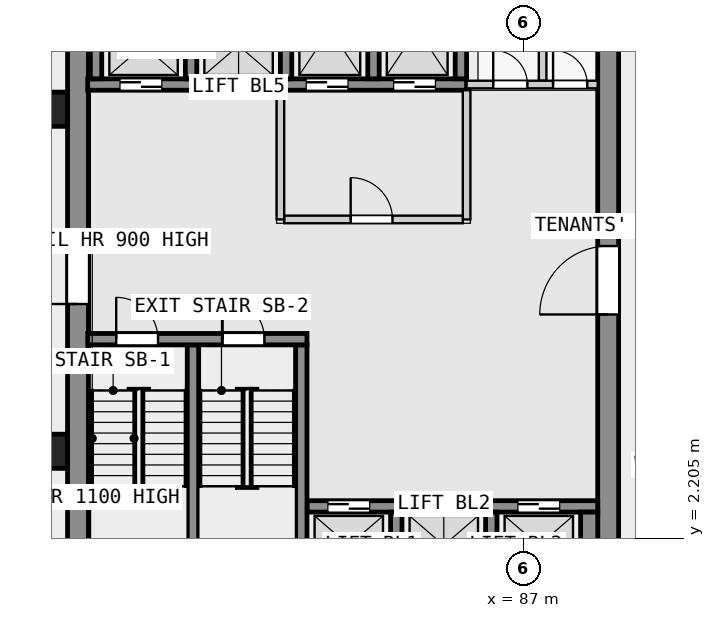
"""IFC4 building model, lengths in metres.
Left out: names, types, materials, properties, quantities, classifications, styles, units other than length and angle.
Written with IfcOpenShell. Run it as: python <this file> out.ifc"""

import sys

from ifc_helpers import new_model, si_unit, direction, frame, frame_2d, origin, origin_2d, place, context, subcontext, project, spatial, rectangle, extrude, element, fill, save


model = new_model("IFC4")
c1 = context("Model", 3, precision=1e-05, world=origin(), true_north=direction((0.0, 1.0)))
c2 = subcontext(c1, "Body", "Model", "MODEL_VIEW")
j1 = project(units=[si_unit("LENGTHUNIT", "METRE"), si_unit("PLANEANGLEUNIT", "RADIAN")], contexts=[c1])
p1 = place(None, origin())
s1 = spatial("IfcSite", under=j1, at=p1, CompositionType="ELEMENT")
p2 = place(p1, origin())
s2 = spatial("IfcBuilding", under=s1, at=p2, CompositionType="ELEMENT")
p3 = place(p2, frame((0.0, 0.0, 26.8)))
s3 = spatial("IfcBuildingStorey", under=s2, at=p3, CompositionType="ELEMENT", Elevation=26.8)
for number, where, z_axis, x_axis in (
    (1, (74.55, 13.5, 0.0), (0.0, 0.0, 1.0), (1.0, 0.0, 0.0)),
    (2, (74.55, 4.5, 0.0), (0.0, 0.0, 1.0), (1.0, 0.0, 0.0)),
):
    element("IfcColumn", number, at=place(p3, frame(where, z_axis=z_axis, x_axis=x_axis)), inside=s3, PredefinedType="COLUMN", context=c2, shape_type="SweptSolid", body=[
        extrude(rectangle(XDim=0.9, YDim=0.9, at=origin_2d()), origin(), (0.0, 0.0, 1.0), 3.5),
    ])
p4 = place(p3, frame((75.275, 0.55, 0.0), z_axis=(0.0, 0.0, 1.0), x_axis=(0.0, 1.0, 0.0)))
e3 = element("IfcWall", 3, at=p4, inside=s3, PredefinedType="SHEAR", context=c2, shape_type="SweptSolid", body=[
    extrude(rectangle(XDim=16.9, YDim=0.55, at=frame_2d((8.45, 0.0))), origin(), (0.0, 0.0, 1.0), 3.25),
])
p5 = place(p4, frame((7.825, 0.0, 0.0)))
e4 = element("IfcOpeningElement", 4, at=p5, cuts=e3, PredefinedType="OPENING", context=c2, shape_type="SweptSolid", body=[
    extrude(rectangle(XDim=1.8, YDim=2.1, at=frame_2d((0.9, 1.05))), frame((0.0, 0.285, 0.0), z_axis=(0.0, -1.0, 0.0), x_axis=(1.0, 0.0, 0.0)), (0.0, 0.0, 1.0), 0.57),
])
p6 = place(p3, frame((89.225, 0.55, 0.0), z_axis=(0.0, 0.0, 1.0), x_axis=(0.0, 1.0, 0.0)))
e5 = element("IfcWall", 5, at=p6, inside=s3, PredefinedType="SHEAR", context=c2, shape_type="SweptSolid", body=[
    extrude(rectangle(XDim=16.9, YDim=0.55, at=frame_2d((8.45, 0.0))), origin(), (0.0, 0.0, 1.0), 3.25),
])
p7 = place(p6, frame((7.55, 0.0, 0.0)))
e6 = element("IfcOpeningElement", 6, at=p7, cuts=e5, PredefinedType="OPENING", context=c2, shape_type="SweptSolid", body=[
    extrude(rectangle(XDim=1.8, YDim=2.1, at=frame_2d((0.9, 1.05))), frame((0.0, 0.285, 0.0), z_axis=(0.0, -1.0, 0.0), x_axis=(1.0, 0.0, 0.0)), (0.0, 0.0, 1.0), 0.57),
])
p8 = place(p3, frame((75.53, 7.45, 0.0), z_axis=(0.0, 0.0, 1.0), x_axis=(1.0, 0.0, 0.0)))
e7 = element("IfcWall", 7, at=p8, inside=s3, PredefinedType="SHEAR", context=c2, shape_type="SweptSolid", body=[
    extrude(rectangle(XDim=5.77, YDim=0.3, at=frame_2d((2.885, 0.0))), origin(), (0.0, 0.0, 1.0), 3.25),
])
p9 = place(p8, frame((0.75, 0.0, 0.0)))
e8 = element("IfcOpeningElement", 8, at=p9, cuts=e7, PredefinedType="OPENING", context=c2, shape_type="SweptSolid", body=[
    extrude(rectangle(XDim=1.1, YDim=2.1, at=frame_2d((0.55, 1.05))), frame((0.0, 0.16, 0.0), z_axis=(0.0, -1.0, 0.0), x_axis=(1.0, 0.0, 0.0)), (0.0, 0.0, 1.0), 0.32),
])
p10 = place(p8, frame((3.55, 0.0, 0.0)))
e9 = element("IfcOpeningElement", 9, at=p10, cuts=e7, PredefinedType="OPENING", context=c2, shape_type="SweptSolid", body=[
    extrude(rectangle(XDim=1.1, YDim=2.1, at=frame_2d((0.55, 1.05))), frame((0.0, 0.16, 0.0), z_axis=(0.0, -1.0, 0.0), x_axis=(1.0, 0.0, 0.0)), (0.0, 0.0, 1.0), 0.32),
])
for number, where, z_axis, x_axis in (
    (10, (78.3, 0.9, 0.0), (0.0, 0.0, 1.0), (0.0, 1.0, 0.0)),
    (11, (81.15, 0.9, 0.0), (0.0, 0.0, 1.0), (0.0, 1.0, 0.0)),
):
    element("IfcWall", number, at=place(p3, frame(where, z_axis=z_axis, x_axis=x_axis)), inside=s3, PredefinedType="SHEAR", context=c2, shape_type="SweptSolid", body=[
        extrude(rectangle(XDim=6.4, YDim=0.3, at=frame_2d((3.2, 0.0))), origin(), (0.0, 0.0, 1.0), 3.25),
    ])
for number, where, z_axis, x_axis in (
    (12, (83.65, 0.9, 0.0), (0.0, 0.0, 1.0), (0.0, 1.0, 0.0)),
    (13, (86.15, 0.9, 0.0), (0.0, 0.0, 1.0), (0.0, 1.0, 0.0)),
):
    element("IfcWall", number, at=place(p3, frame(where, z_axis=z_axis, x_axis=x_axis)), inside=s3, PredefinedType="SHEAR", context=c2, shape_type="SweptSolid", body=[
        extrude(rectangle(XDim=2.0, YDim=0.3, at=frame_2d((1.0, 0.0))), origin(), (0.0, 0.0, 1.0), 3.25),
    ])
p11 = place(p3, frame((88.725, 0.9, 0.0), z_axis=(0.0, 0.0, 1.0), x_axis=(0.0, 1.0, 0.0)))
e14 = element("IfcWall", 14, at=p11, inside=s3, PredefinedType="SHEAR", context=c2, shape_type="SweptSolid", body=[
    extrude(rectangle(XDim=2.0, YDim=0.45, at=frame_2d((1.0, 0.0))), origin(), (0.0, 0.0, 1.0), 3.25),
])
p12 = place(p3, frame((81.3, 3.05, 0.0), z_axis=(0.0, 0.0, 1.0), x_axis=(1.0, 0.0, 0.0)))
e15 = element("IfcWall", 15, at=p12, inside=s3, PredefinedType="SHEAR", context=c2, shape_type="SweptSolid", body=[
    extrude(rectangle(XDim=7.65, YDim=0.3, at=frame_2d((3.825, 0.0))), origin(), (0.0, 0.0, 1.0), 3.25),
])
p13 = place(p12, frame((0.55, 0.0, 0.0)))
e16 = element("IfcOpeningElement", 16, at=p13, cuts=e15, PredefinedType="OPENING", context=c2, shape_type="SweptSolid", body=[
    extrude(rectangle(XDim=1.1, YDim=2.1, at=frame_2d((0.55, 1.05))), frame((0.0, 0.16, 0.0), z_axis=(0.0, -1.0, 0.0), x_axis=(1.0, 0.0, 0.0)), (0.0, 0.0, 1.0), 0.32),
])
p14 = place(p12, frame((3.05, 0.0, 0.0)))
e17 = element("IfcOpeningElement", 17, at=p14, cuts=e15, PredefinedType="OPENING", context=c2, shape_type="SweptSolid", body=[
    extrude(rectangle(XDim=1.1, YDim=2.1, at=frame_2d((0.55, 1.05))), frame((0.0, 0.16, 0.0), z_axis=(0.0, -1.0, 0.0), x_axis=(1.0, 0.0, 0.0)), (0.0, 0.0, 1.0), 0.32),
])
p15 = place(p12, frame((5.55, 0.0, 0.0)))
e18 = element("IfcOpeningElement", 18, at=p15, cuts=e15, PredefinedType="OPENING", context=c2, shape_type="SweptSolid", body=[
    extrude(rectangle(XDim=1.1, YDim=2.1, at=frame_2d((0.55, 1.05))), frame((0.0, 0.16, 0.0), z_axis=(0.0, -1.0, 0.0), x_axis=(1.0, 0.0, 0.0)), (0.0, 0.0, 1.0), 0.32),
])
p16 = place(p3, frame((75.53, 14.15, 0.0), z_axis=(0.0, 0.0, 1.0), x_axis=(1.0, 0.0, 0.0)))
e19 = element("IfcWall", 19, at=p16, inside=s3, PredefinedType="SHEAR", context=c2, shape_type="SweptSolid", body=[
    extrude(rectangle(XDim=9.97, YDim=0.3, at=frame_2d((4.985, 0.0))), origin(), (0.0, 0.0, 1.0), 3.25),
])
p17 = place(p16, frame((0.85, 0.0, 0.0)))
e20 = element("IfcOpeningElement", 20, at=p17, cuts=e19, PredefinedType="OPENING", context=c2, shape_type="SweptSolid", body=[
    extrude(rectangle(XDim=1.1, YDim=2.1, at=frame_2d((0.55, 1.05))), frame((0.0, 0.16, 0.0), z_axis=(0.0, -1.0, 0.0), x_axis=(1.0, 0.0, 0.0)), (0.0, 0.0, 1.0), 0.32),
])
p18 = place(p16, frame((3.35, 0.0, 0.0)))
e21 = element("IfcOpeningElement", 21, at=p18, cuts=e19, PredefinedType="OPENING", context=c2, shape_type="SweptSolid", body=[
    extrude(rectangle(XDim=1.1, YDim=2.1, at=frame_2d((0.55, 1.05))), frame((0.0, 0.16, 0.0), z_axis=(0.0, -1.0, 0.0), x_axis=(1.0, 0.0, 0.0)), (0.0, 0.0, 1.0), 0.32),
])
p19 = place(p16, frame((5.75, 0.0, 0.0)))
e22 = element("IfcOpeningElement", 22, at=p19, cuts=e19, PredefinedType="OPENING", context=c2, shape_type="SweptSolid", body=[
    extrude(rectangle(XDim=1.1, YDim=2.1, at=frame_2d((0.55, 1.05))), frame((0.0, 0.16, 0.0), z_axis=(0.0, -1.0, 0.0), x_axis=(1.0, 0.0, 0.0)), (0.0, 0.0, 1.0), 0.32),
])
p20 = place(p16, frame((8.05, 0.0, 0.0)))
e23 = element("IfcOpeningElement", 23, at=p20, cuts=e19, PredefinedType="OPENING", context=c2, shape_type="SweptSolid", body=[
    extrude(rectangle(XDim=1.1, YDim=2.1, at=frame_2d((0.55, 1.05))), frame((0.0, 0.16, 0.0), z_axis=(0.0, -1.0, 0.0), x_axis=(1.0, 0.0, 0.0)), (0.0, 0.0, 1.0), 0.32),
])
for number, where, z_axis, x_axis in (
    (24, (75.75, 14.3, 0.0), (0.0, 0.0, 1.0), (0.0, 1.0, 0.0)),
    (25, (78.25, 14.3, 0.0), (0.0, 0.0, 1.0), (0.0, 1.0, 0.0)),
    (26, (80.75, 14.3, 0.0), (0.0, 0.0, 1.0), (0.0, 1.0, 0.0)),
    (27, (83.05, 14.3, 0.0), (0.0, 0.0, 1.0), (0.0, 1.0, 0.0)),
    (28, (85.35, 14.3, 0.0), (0.0, 0.0, 1.0), (0.0, 1.0, 0.0)),
):
    element("IfcWall", number, at=place(p3, frame(where, z_axis=z_axis, x_axis=x_axis)), inside=s3, PredefinedType="SHEAR", context=c2, shape_type="SweptSolid", body=[
        extrude(rectangle(XDim=2.8, YDim=0.3, at=frame_2d((1.4, 0.0))), origin(), (0.0, 0.0, 1.0), 3.25),
    ])
p21 = place(p3, frame((80.6, 10.6, 0.0), z_axis=(0.0, 0.0, 1.0), x_axis=(0.0, 1.0, 0.0)))
e29 = element("IfcWall", 29, at=p21, inside=s3, PredefinedType="PARTITIONING", context=c2, shape_type="SweptSolid", body=[
    extrude(rectangle(XDim=3.4, YDim=0.2, at=frame_2d((1.7, 0.0))), origin(), (0.0, 0.0, 1.0), 3.25),
])
p22 = place(p3, frame((80.7, 10.6, 0.0), z_axis=(0.0, 0.0, 1.0), x_axis=(1.0, 0.0, 0.0)))
e30 = element("IfcWall", 30, at=p22, inside=s3, PredefinedType="PARTITIONING", context=c2, shape_type="SweptSolid", body=[
    extrude(rectangle(XDim=4.7, YDim=0.2, at=frame_2d((2.35, 0.0))), origin(), (0.0, 0.0, 1.0), 3.25),
])
p23 = place(p22, frame((1.75, 0.0, 0.0)))
e31 = element("IfcOpeningElement", 31, at=p23, cuts=e30, PredefinedType="OPENING", context=c2, shape_type="SweptSolid", body=[
    extrude(rectangle(XDim=1.1, YDim=2.1, at=frame_2d((0.55, 1.05))), frame((0.0, 0.11, 0.0), z_axis=(0.0, -1.0, 0.0), x_axis=(1.0, 0.0, 0.0)), (0.0, 0.0, 1.0), 0.22),
])
p24 = place(p3, frame((85.5, 10.6, 0.0), z_axis=(0.0, 0.0, 1.0), x_axis=(0.0, 1.0, 0.0)))
e32 = element("IfcWall", 32, at=p24, inside=s3, PredefinedType="PARTITIONING", context=c2, shape_type="SweptSolid", body=[
    extrude(rectangle(XDim=3.4, YDim=0.2, at=frame_2d((1.7, 0.0))), origin(), (0.0, 0.0, 1.0), 3.25),
])
p25 = place(p3, frame((85.5, 14.15, 0.0), z_axis=(0.0, 0.0, 1.0), x_axis=(1.0, 0.0, 0.0)))
e33 = element("IfcWall", 33, at=p25, inside=s3, PredefinedType="PARTITIONING", context=c2, shape_type="SweptSolid", body=[
    extrude(rectangle(XDim=3.45, YDim=0.2, at=frame_2d((1.725, 0.0))), origin(), (0.0, 0.0, 1.0), 3.25),
])
p26 = place(p25, frame((0.7, 0.0, 0.0)))
e34 = element("IfcOpeningElement", 34, at=p26, cuts=e33, PredefinedType="OPENING", context=c2, shape_type="SweptSolid", body=[
    extrude(rectangle(XDim=0.9, YDim=2.1, at=frame_2d((0.45, 1.05))), frame((0.0, 0.11, 0.0), z_axis=(0.0, -1.0, 0.0), x_axis=(1.0, 0.0, 0.0)), (0.0, 0.0, 1.0), 0.22),
])
p27 = place(p25, frame((2.275, 0.0, 0.0)))
e35 = element("IfcOpeningElement", 35, at=p27, cuts=e33, PredefinedType="OPENING", context=c2, shape_type="SweptSolid", body=[
    extrude(rectangle(XDim=0.9, YDim=2.1, at=frame_2d((0.45, 1.05))), frame((0.0, 0.11, 0.0), z_axis=(0.0, -1.0, 0.0), x_axis=(1.0, 0.0, 0.0)), (0.0, 0.0, 1.0), 0.22),
])
p28 = place(p3, frame((87.5, 14.25, 0.0), z_axis=(0.0, 0.0, 1.0), x_axis=(0.0, 1.0, 0.0)))
e36 = element("IfcWall", 36, at=p28, inside=s3, PredefinedType="PARTITIONING", context=c2, shape_type="SweptSolid", body=[
    extrude(rectangle(XDim=3.2, YDim=0.2, at=frame_2d((1.6, 0.0))), origin(), (0.0, 0.0, 1.0), 3.25),
])
p29 = place(p23, origin())
e37 = element("IfcDoor", 37, at=p29, inside=s3, OperationType="SINGLE_SWING_LEFT", PredefinedType="DOOR", context=c2, shape_type="SweptSolid", body=[
    extrude(rectangle(XDim=1.1, YDim=2.1, at=frame_2d((0.55, 1.05))), frame((0.0, 0.025, 0.0), z_axis=(0.0, -1.0, 0.0), x_axis=(1.0, 0.0, 0.0)), (0.0, 0.0, 1.0), 0.05),
])
fill(e31, e37)
p30 = place(p13, origin())
e38 = element("IfcDoor", 38, at=p30, inside=s3, OperationType="DOUBLE_DOOR_SLIDING", PredefinedType="DOOR", context=c2, shape_type="SweptSolid", body=[
    extrude(rectangle(XDim=1.1, YDim=2.1, at=frame_2d((0.55, 1.05))), frame((0.0, 0.025, 0.0), z_axis=(0.0, -1.0, 0.0), x_axis=(1.0, 0.0, 0.0)), (0.0, 0.0, 1.0), 0.05),
])
fill(e16, e38)
p31 = place(p14, origin())
e39 = element("IfcDoor", 39, at=p31, inside=s3, OperationType="DOUBLE_DOOR_SLIDING", PredefinedType="DOOR", context=c2, shape_type="SweptSolid", body=[
    extrude(rectangle(XDim=1.1, YDim=2.1, at=frame_2d((0.55, 1.05))), frame((0.0, 0.025, 0.0), z_axis=(0.0, -1.0, 0.0), x_axis=(1.0, 0.0, 0.0)), (0.0, 0.0, 1.0), 0.05),
])
fill(e17, e39)
p32 = place(p15, origin())
e40 = element("IfcDoor", 40, at=p32, inside=s3, OperationType="DOUBLE_DOOR_SLIDING", PredefinedType="DOOR", context=c2, shape_type="SweptSolid", body=[
    extrude(rectangle(XDim=1.1, YDim=2.1, at=frame_2d((0.55, 1.05))), frame((0.0, 0.025, 0.0), z_axis=(0.0, -1.0, 0.0), x_axis=(1.0, 0.0, 0.0)), (0.0, 0.0, 1.0), 0.05),
])
fill(e18, e40)
p33 = place(p17, origin())
e41 = element("IfcDoor", 41, at=p33, inside=s3, OperationType="DOUBLE_DOOR_SLIDING", PredefinedType="DOOR", context=c2, shape_type="SweptSolid", body=[
    extrude(rectangle(XDim=1.1, YDim=2.1, at=frame_2d((0.55, 1.05))), frame((0.0, 0.025, 0.0), z_axis=(0.0, -1.0, 0.0), x_axis=(1.0, 0.0, 0.0)), (0.0, 0.0, 1.0), 0.05),
])
fill(e20, e41)
p34 = place(p18, origin())
e42 = element("IfcDoor", 42, at=p34, inside=s3, OperationType="DOUBLE_DOOR_SLIDING", PredefinedType="DOOR", context=c2, shape_type="SweptSolid", body=[
    extrude(rectangle(XDim=1.1, YDim=2.1, at=frame_2d((0.55, 1.05))), frame((0.0, 0.025, 0.0), z_axis=(0.0, -1.0, 0.0), x_axis=(1.0, 0.0, 0.0)), (0.0, 0.0, 1.0), 0.05),
])
fill(e21, e42)
p35 = place(p19, origin())
e43 = element("IfcDoor", 43, at=p35, inside=s3, OperationType="DOUBLE_DOOR_SLIDING", PredefinedType="DOOR", context=c2, shape_type="SweptSolid", body=[
    extrude(rectangle(XDim=1.1, YDim=2.1, at=frame_2d((0.55, 1.05))), frame((0.0, 0.025, 0.0), z_axis=(0.0, -1.0, 0.0), x_axis=(1.0, 0.0, 0.0)), (0.0, 0.0, 1.0), 0.05),
])
fill(e22, e43)
p36 = place(p20, origin())
e44 = element("IfcDoor", 44, at=p36, inside=s3, OperationType="DOUBLE_DOOR_SLIDING", PredefinedType="DOOR", context=c2, shape_type="SweptSolid", body=[
    extrude(rectangle(XDim=1.1, YDim=2.1, at=frame_2d((0.55, 1.05))), frame((0.0, 0.025, 0.0), z_axis=(0.0, -1.0, 0.0), x_axis=(1.0, 0.0, 0.0)), (0.0, 0.0, 1.0), 0.05),
])
fill(e23, e44)
p37 = place(p9, origin())
e45 = element("IfcDoor", 45, at=p37, inside=s3, OperationType="SINGLE_SWING_RIGHT", PredefinedType="DOOR", context=c2, shape_type="SweptSolid", body=[
    extrude(rectangle(XDim=1.1, YDim=2.1, at=frame_2d((0.55, 1.05))), frame((0.0, 0.025, 0.0), z_axis=(0.0, -1.0, 0.0), x_axis=(1.0, 0.0, 0.0)), (0.0, 0.0, 1.0), 0.05),
])
fill(e8, e45)
p38 = place(p10, origin())
e46 = element("IfcDoor", 46, at=p38, inside=s3, OperationType="SINGLE_SWING_LEFT", PredefinedType="DOOR", context=c2, shape_type="SweptSolid", body=[
    extrude(rectangle(XDim=1.1, YDim=2.1, at=frame_2d((0.55, 1.05))), frame((0.0, 0.025, 0.0), z_axis=(0.0, -1.0, 0.0), x_axis=(1.0, 0.0, 0.0)), (0.0, 0.0, 1.0), 0.05),
])
fill(e9, e46)
p39 = place(p5, origin())
e47 = element("IfcDoor", 47, at=p39, inside=s3, OperationType="DOUBLE_DOOR_SINGLE_SWING", PredefinedType="DOOR", context=c2, shape_type="SweptSolid", body=[
    extrude(rectangle(XDim=1.8, YDim=2.1, at=frame_2d((0.9, 1.05))), frame((0.0, 0.025, 0.0), z_axis=(0.0, -1.0, 0.0), x_axis=(1.0, 0.0, 0.0)), (0.0, 0.0, 1.0), 0.05),
])
fill(e4, e47)
p40 = place(p7, origin())
e48 = element("IfcDoor", 48, at=p40, inside=s3, OperationType="DOUBLE_DOOR_SINGLE_SWING", PredefinedType="DOOR", context=c2, shape_type="SweptSolid", body=[
    extrude(rectangle(XDim=1.8, YDim=2.1, at=frame_2d((0.9, 1.05))), frame((0.0, 0.025, 0.0), z_axis=(0.0, -1.0, 0.0), x_axis=(1.0, 0.0, 0.0)), (0.0, 0.0, 1.0), 0.05),
])
fill(e6, e48)
p41 = place(p26, origin())
e49 = element("IfcDoor", 49, at=p41, inside=s3, OperationType="SINGLE_SWING_LEFT", PredefinedType="DOOR", context=c2, shape_type="SweptSolid", body=[
    extrude(rectangle(XDim=0.9, YDim=2.1, at=frame_2d((0.45, 1.05))), frame((0.0, 0.025, 0.0), z_axis=(0.0, -1.0, 0.0), x_axis=(1.0, 0.0, 0.0)), (0.0, 0.0, 1.0), 0.05),
])
fill(e34, e49)
p42 = place(p27, origin())
e50 = element("IfcDoor", 50, at=p42, inside=s3, OperationType="SINGLE_SWING_LEFT", PredefinedType="DOOR", context=c2, shape_type="SweptSolid", body=[
    extrude(rectangle(XDim=0.9, YDim=2.1, at=frame_2d((0.45, 1.05))), frame((0.0, 0.025, 0.0), z_axis=(0.0, -1.0, 0.0), x_axis=(1.0, 0.0, 0.0)), (0.0, 0.0, 1.0), 0.05),
])
fill(e35, e50)
save(model, sys.argv[1])
